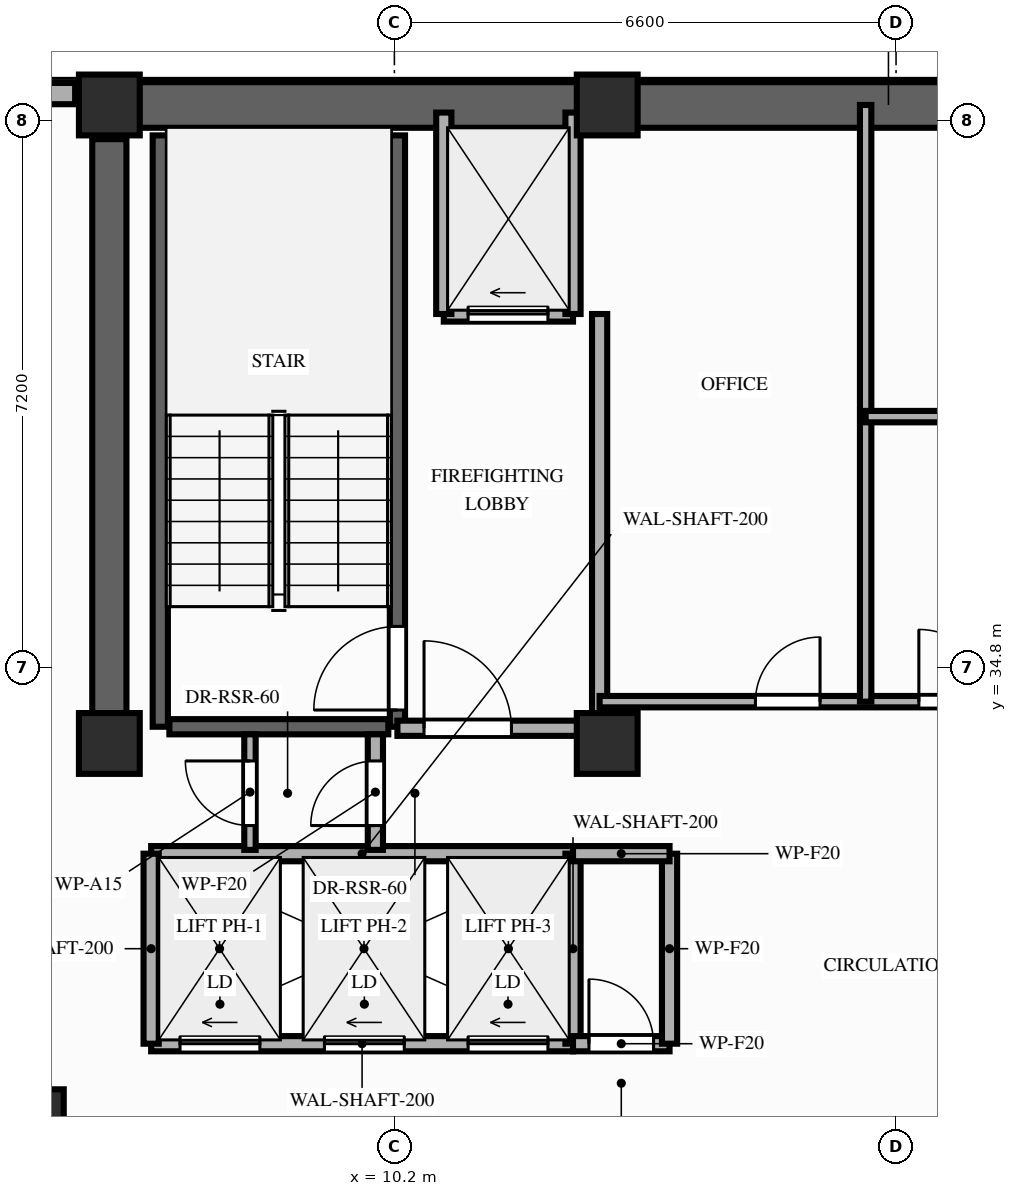
"""IFC4 building model, lengths in metres.
Left out: names, types, materials, properties, quantities, classifications, styles, units other than length and angle.
Written with IfcOpenShell. Run it as: python <this file> out.ifc"""

import sys

from ifc_helpers import new_model, si_unit, direction, frame, frame_2d, origin, origin_2d, place, context, subcontext, project, spatial, rectangle, extrude, element, fill, save


model = new_model("IFC4")
c1 = context("Model", 3, precision=1e-05, world=origin(), true_north=direction((0.0, 1.0)))
c2 = subcontext(c1, "Body", "Model", "MODEL_VIEW")
j1 = project(units=[si_unit("LENGTHUNIT", "METRE"), si_unit("PLANEANGLEUNIT", "RADIAN")], contexts=[c1])
p1 = place(None, origin())
s1 = spatial("IfcSite", under=j1, at=p1, CompositionType="ELEMENT")
p2 = place(p1, origin())
s2 = spatial("IfcBuilding", under=s1, at=p2, CompositionType="ELEMENT")
p3 = place(p2, frame((0.0, 0.0, 201.6)))
s3 = spatial("IfcBuildingStorey", under=s2, at=p3, CompositionType="ELEMENT", Elevation=201.6)
for number, where, z_axis, x_axis in (
    (1, (6.45, 33.8, 0.0), (0.0, 0.0, 1.0), (1.0, 0.0, 0.0)),
    (2, (13.0, 33.8, 0.0), (0.0, 0.0, 1.0), (1.0, 0.0, 0.0)),
    (3, (6.45, 42.2, 0.0), (0.0, 0.0, 1.0), (1.0, 0.0, 0.0)),
    (4, (13.0, 42.2, 0.0), (0.0, 0.0, 1.0), (1.0, 0.0, 0.0)),
):
    element("IfcColumn", number, at=place(p3, frame(where, z_axis=z_axis, x_axis=x_axis)), inside=s3, PredefinedType="COLUMN", context=c2, shape_type="SweptSolid", body=[
        extrude(rectangle(XDim=0.8, YDim=0.8, at=origin_2d()), origin(), (0.0, 0.0, 1.0), 3.2),
    ])
p4 = place(p3, frame((5.4, 28.8, 0.0), z_axis=(0.0, 0.0, 1.0), x_axis=(1.0, 0.0, 0.0)))
e5 = element("IfcColumn", 5, at=p4, inside=s3, PredefinedType="COLUMN", context=c2, shape_type="SweptSolid", body=[
    extrude(rectangle(XDim=0.9, YDim=0.9, at=origin_2d()), origin(), (0.0, 0.0, 1.0), 3.2),
])
p5 = place(p3, frame((6.0, 42.35, 0.0), z_axis=(0.0, 0.0, 1.0), x_axis=(-1.0, 0.0, 0.0)))
e6 = element("IfcWall", 6, at=p5, inside=s3, PredefinedType="STANDARD", context=c2, shape_type="SweptSolid", body=[
    extrude(rectangle(XDim=2.0, YDim=0.28, at=frame_2d((1.0, 0.0))), origin(), (0.0, 0.0, 1.0), 3.02),
])
p6 = place(p3, frame((6.45, 42.2, 0.0), z_axis=(0.0, 0.0, 1.0), x_axis=(1.0, 0.0, 0.0)))
e7 = element("IfcWall", 7, at=p6, inside=s3, PredefinedType="SHEAR", context=c2, shape_type="SweptSolid", body=[
    extrude(rectangle(XDim=20.45, YDim=0.6, at=frame_2d((10.225, 0.0))), origin(), (0.0, 0.0, 1.0), 3.02),
])
p7 = place(p3, frame((6.45, 33.8, 0.0), z_axis=(0.0, 0.0, 1.0), x_axis=(0.0, 1.0, 0.0)))
e8 = element("IfcWall", 8, at=p7, inside=s3, PredefinedType="SHEAR", context=c2, shape_type="SweptSolid", body=[
    extrude(rectangle(XDim=7.95, YDim=0.45, at=frame_2d((3.975, 0.0))), origin(), (0.0, 0.0, 1.0), 3.02),
])
p8 = place(p3, frame((7.12, 34.02, 0.0), z_axis=(0.0, 0.0, 1.0), x_axis=(0.0, 1.0, 0.0)))
e9 = element("IfcWall", 9, at=p8, inside=s3, PredefinedType="SHEAR", context=c2, shape_type="SweptSolid", body=[
    extrude(rectangle(XDim=7.78, YDim=0.2, at=frame_2d((3.89, 0.0))), origin(), (0.0, 0.0, 1.0), 3.02),
])
p9 = place(p3, frame((10.24, 34.02, 0.0), z_axis=(0.0, 0.0, 1.0), x_axis=(0.0, 1.0, 0.0)))
e10 = element("IfcWall", 10, at=p9, inside=s3, PredefinedType="SHEAR", context=c2, shape_type="SweptSolid", body=[
    extrude(rectangle(XDim=7.78, YDim=0.2, at=frame_2d((3.89, 0.0))), origin(), (0.0, 0.0, 1.0), 3.02),
])
p10 = place(p9, frame((0.22, 0.0, 0.0)))
e11 = element("IfcOpeningElement", 11, at=p10, cuts=e10, PredefinedType="OPENING", context=c2, shape_type="SweptSolid", body=[
    extrude(rectangle(XDim=1.1, YDim=2.15, at=frame_2d((0.55, 1.075))), frame((0.0, 0.11, 0.0), z_axis=(0.0, -1.0, 0.0), x_axis=(1.0, 0.0, 0.0)), (0.0, 0.0, 1.0), 0.22),
])
p11 = place(p3, frame((7.24, 34.02, 0.0), z_axis=(0.0, 0.0, 1.0), x_axis=(1.0, 0.0, 0.0)))
e12 = element("IfcWall", 12, at=p11, inside=s3, PredefinedType="SHEAR", context=c2, shape_type="SweptSolid", body=[
    extrude(rectangle(XDim=2.88, YDim=0.2, at=frame_2d((1.44, 0.0))), origin(), (0.0, 0.0, 1.0), 3.02),
])
p12 = place(p3, frame((7.0, 29.85, 0.0), z_axis=(0.0, 0.0, 1.0), x_axis=(1.0, 0.0, 0.0)))
e13 = element("IfcWall", 13, at=p12, inside=s3, PredefinedType="MOVABLE", context=c2, shape_type="SweptSolid", body=[
    extrude(rectangle(XDim=5.55, YDim=0.2, at=frame_2d((2.775, 0.0))), origin(), (0.0, 0.0, 1.0), 3.02),
])
p13 = place(p12, frame((0.38, 0.0, 0.0)))
e14 = element("IfcOpeningElement", 14, at=p13, cuts=e13, PredefinedType="OPENING", context=c2, shape_type="SweptSolid", body=[
    extrude(rectangle(XDim=1.05, YDim=2.15, at=frame_2d((0.525, 1.075))), frame((0.0, 0.11, 0.0), z_axis=(0.0, -1.0, 0.0), x_axis=(1.0, 0.0, 0.0)), (0.0, 0.0, 1.0), 0.22),
])
p14 = place(p12, frame((2.28, 0.0, 0.0)))
e15 = element("IfcOpeningElement", 15, at=p14, cuts=e13, PredefinedType="OPENING", context=c2, shape_type="SweptSolid", body=[
    extrude(rectangle(XDim=1.05, YDim=2.15, at=frame_2d((0.525, 1.075))), frame((0.0, 0.11, 0.0), z_axis=(0.0, -1.0, 0.0), x_axis=(1.0, 0.0, 0.0)), (0.0, 0.0, 1.0), 0.22),
])
p15 = place(p12, frame((4.17, 0.0, 0.0)))
e16 = element("IfcOpeningElement", 16, at=p15, cuts=e13, PredefinedType="OPENING", context=c2, shape_type="SweptSolid", body=[
    extrude(rectangle(XDim=1.05, YDim=2.15, at=frame_2d((0.525, 1.075))), frame((0.0, 0.11, 0.0), z_axis=(0.0, -1.0, 0.0), x_axis=(1.0, 0.0, 0.0)), (0.0, 0.0, 1.0), 0.22),
])
p16 = place(p3, frame((7.0, 32.35, 0.0), z_axis=(0.0, 0.0, 1.0), x_axis=(1.0, 0.0, 0.0)))
e17 = element("IfcWall", 17, at=p16, inside=s3, PredefinedType="MOVABLE", context=c2, shape_type="SweptSolid", body=[
    extrude(rectangle(XDim=5.55, YDim=0.2, at=frame_2d((2.775, 0.0))), origin(), (0.0, 0.0, 1.0), 3.02),
])
for number, where, z_axis, x_axis in (
    (18, (7.0, 29.85, 0.0), (0.0, 0.0, 1.0), (0.0, 1.0, 0.0)),
    (19, (12.55, 29.85, 0.0), (0.0, 0.0, 1.0), (0.0, 1.0, 0.0)),
):
    element("IfcWall", number, at=place(p3, frame(where, z_axis=z_axis, x_axis=x_axis)), inside=s3, PredefinedType="MOVABLE", context=c2, shape_type="SweptSolid", body=[
        extrude(rectangle(XDim=2.5, YDim=0.2, at=frame_2d((1.25, 0.0))), origin(), (0.0, 0.0, 1.0), 3.02),
    ])
p17 = place(p3, frame((10.85, 39.45, 0.0), z_axis=(0.0, 0.0, 1.0), x_axis=(1.0, 0.0, 0.0)))
e20 = element("IfcWall", 20, at=p17, inside=s3, PredefinedType="MOVABLE", context=c2, shape_type="SweptSolid", body=[
    extrude(rectangle(XDim=1.7, YDim=0.2, at=frame_2d((0.85, 0.0))), origin(), (0.0, 0.0, 1.0), 3.02),
])
p18 = place(p17, frame((0.32, 0.0, 0.0)))
e21 = element("IfcOpeningElement", 21, at=p18, cuts=e20, PredefinedType="OPENING", context=c2, shape_type="SweptSolid", body=[
    extrude(rectangle(XDim=1.05, YDim=2.15, at=frame_2d((0.525, 1.075))), frame((0.0, 0.11, 0.0), z_axis=(0.0, -1.0, 0.0), x_axis=(1.0, 0.0, 0.0)), (0.0, 0.0, 1.0), 0.22),
])
for number, where, z_axis, x_axis in (
    (22, (10.85, 39.45, 0.0), (0.0, 0.0, 1.0), (0.0, 1.0, 0.0)),
    (23, (12.55, 39.45, 0.0), (0.0, 0.0, 1.0), (0.0, 1.0, 0.0)),
):
    element("IfcWall", number, at=place(p3, frame(where, z_axis=z_axis, x_axis=x_axis)), inside=s3, PredefinedType="MOVABLE", context=c2, shape_type="SweptSolid", body=[
        extrude(rectangle(XDim=2.65, YDim=0.2, at=frame_2d((1.325, 0.0))), origin(), (0.0, 0.0, 1.0), 2.51),
    ])
p19 = place(p3, frame((12.9, 34.0, 0.0), z_axis=(0.0, 0.0, 1.0), x_axis=(0.0, 1.0, 0.0)))
e24 = element("IfcWall", 24, at=p19, inside=s3, PredefinedType="PARTITIONING", context=c2, shape_type="SweptSolid", body=[
    extrude(rectangle(XDim=5.45, YDim=0.2, at=frame_2d((2.725, 0.0))), origin(), (0.0, 0.0, 1.0), 2.51),
])
p20 = place(p3, frame((10.24, 34.0, 0.0), z_axis=(0.0, 0.0, 1.0), x_axis=(1.0, 0.0, 0.0)))
e25 = element("IfcWall", 25, at=p20, inside=s3, PredefinedType="PARTITIONING", context=c2, shape_type="SweptSolid", body=[
    extrude(rectangle(XDim=2.66, YDim=0.2, at=frame_2d((1.33, 0.0))), origin(), (0.0, 0.0, 1.0), 2.51),
])
p21 = place(p20, frame((0.35, 0.0, 0.0)))
e26 = element("IfcOpeningElement", 26, at=p21, cuts=e25, PredefinedType="OPENING", context=c2, shape_type="SweptSolid", body=[
    extrude(rectangle(XDim=1.15, YDim=2.15, at=frame_2d((0.575, 1.075))), frame((0.0, 0.11, 0.0), z_axis=(0.0, -1.0, 0.0), x_axis=(1.0, 0.0, 0.0)), (0.0, 0.0, 1.0), 0.22),
])
p22 = place(p3, frame((9.95, 32.4, 0.0), z_axis=(0.0, 0.0, 1.0), x_axis=(0.0, 1.0, 0.0)))
e27 = element("IfcWall", 27, at=p22, inside=s3, PredefinedType="PARTITIONING", context=c2, shape_type="SweptSolid", body=[
    extrude(rectangle(XDim=1.52, YDim=0.2, at=frame_2d((0.76, 0.0))), origin(), (0.0, 0.0, 1.0), 2.51),
])
p23 = place(p22, frame((0.32, 0.0, 0.0)))
e28 = element("IfcOpeningElement", 28, at=p23, cuts=e27, PredefinedType="OPENING", context=c2, shape_type="SweptSolid", body=[
    extrude(rectangle(XDim=0.85, YDim=2.05, at=frame_2d((0.425, 1.025))), frame((0.0, 0.11, 0.0), z_axis=(0.0, -1.0, 0.0), x_axis=(1.0, 0.0, 0.0)), (0.0, 0.0, 1.0), 0.22),
])
p24 = place(p3, frame((8.3, 32.4, 0.0), z_axis=(0.0, 0.0, 1.0), x_axis=(0.0, 1.0, 0.0)))
e29 = element("IfcWall", 29, at=p24, inside=s3, PredefinedType="PARTITIONING", context=c2, shape_type="SweptSolid", body=[
    extrude(rectangle(XDim=1.52, YDim=0.15, at=frame_2d((0.76, 0.0))), origin(), (0.0, 0.0, 1.0), 2.51),
])
p25 = place(p24, frame((0.32, 0.0, 0.0)))
e30 = element("IfcOpeningElement", 30, at=p25, cuts=e29, PredefinedType="OPENING", context=c2, shape_type="SweptSolid", body=[
    extrude(rectangle(XDim=0.85, YDim=2.05, at=frame_2d((0.425, 1.025))), frame((0.0, 0.085, 0.0), z_axis=(0.0, -1.0, 0.0), x_axis=(1.0, 0.0, 0.0)), (0.0, 0.0, 1.0), 0.17),
])
p26 = place(p3, frame((12.55, 29.85, 0.0), z_axis=(0.0, 0.0, 1.0), x_axis=(1.0, 0.0, 0.0)))
e31 = element("IfcWall", 31, at=p26, inside=s3, PredefinedType="PARTITIONING", context=c2, shape_type="SweptSolid", body=[
    extrude(rectangle(XDim=1.27, YDim=0.2, at=frame_2d((0.635, 0.0))), origin(), (0.0, 0.0, 1.0), 3.02),
])
p27 = place(p26, frame((0.21, 0.0, 0.0)))
e32 = element("IfcOpeningElement", 32, at=p27, cuts=e31, PredefinedType="OPENING", context=c2, shape_type="SweptSolid", body=[
    extrude(rectangle(XDim=0.85, YDim=2.05, at=frame_2d((0.425, 1.025))), frame((0.0, 0.11, 0.0), z_axis=(0.0, -1.0, 0.0), x_axis=(1.0, 0.0, 0.0)), (0.0, 0.0, 1.0), 0.22),
])
p28 = place(p3, frame((13.82, 29.85, 0.0), z_axis=(0.0, 0.0, 1.0), x_axis=(0.0, 1.0, 0.0)))
e33 = element("IfcWall", 33, at=p28, inside=s3, PredefinedType="PARTITIONING", context=c2, shape_type="SweptSolid", body=[
    extrude(rectangle(XDim=2.5, YDim=0.2, at=frame_2d((1.25, 0.0))), origin(), (0.0, 0.0, 1.0), 3.02),
])
p29 = place(p3, frame((12.55, 32.35, 0.0), z_axis=(0.0, 0.0, 1.0), x_axis=(1.0, 0.0, 0.0)))
e34 = element("IfcWall", 34, at=p29, inside=s3, PredefinedType="PARTITIONING", context=c2, shape_type="SweptSolid", body=[
    extrude(rectangle(XDim=1.27, YDim=0.2, at=frame_2d((0.635, 0.0))), origin(), (0.0, 0.0, 1.0), 3.02),
])
p30 = place(p3, frame((12.9, 34.35, 0.0), z_axis=(0.0, 0.0, 1.0), x_axis=(1.0, 0.0, 0.0)))
e35 = element("IfcWall", 35, at=p30, inside=s3, PredefinedType="PARTITIONING", context=c2, shape_type="SweptSolid", body=[
    extrude(rectangle(XDim=7.6, YDim=0.15, at=frame_2d((3.8, 0.0))), origin(), (0.0, 0.0, 1.0), 3.02),
])
p31 = place(p30, frame((2.05, 0.0, 0.0)))
e36 = element("IfcOpeningElement", 36, at=p31, cuts=e35, PredefinedType="OPENING", context=c2, shape_type="SweptSolid", body=[
    extrude(rectangle(XDim=0.85, YDim=2.05, at=frame_2d((0.425, 1.025))), frame((0.0, 0.085, 0.0), z_axis=(0.0, -1.0, 0.0), x_axis=(1.0, 0.0, 0.0)), (0.0, 0.0, 1.0), 0.17),
])
p32 = place(p30, frame((4.2, 0.0, 0.0)))
e37 = element("IfcOpeningElement", 37, at=p32, cuts=e35, PredefinedType="OPENING", context=c2, shape_type="SweptSolid", body=[
    extrude(rectangle(XDim=0.95, YDim=2.15, at=frame_2d((0.475, 1.075))), frame((0.0, 0.085, 0.0), z_axis=(0.0, -1.0, 0.0), x_axis=(1.0, 0.0, 0.0)), (0.0, 0.0, 1.0), 0.17),
])
p33 = place(p3, frame((16.4, 34.35, 0.0), z_axis=(0.0, 0.0, 1.0), x_axis=(0.0, 1.0, 0.0)))
e38 = element("IfcWall", 38, at=p33, inside=s3, PredefinedType="PARTITIONING", context=c2, shape_type="SweptSolid", body=[
    extrude(rectangle(XDim=7.85, YDim=0.15, at=frame_2d((3.925, 0.0))), origin(), (0.0, 0.0, 1.0), 2.51),
])
p34 = place(p3, frame((16.4, 38.1, 0.0), z_axis=(0.0, 0.0, 1.0), x_axis=(1.0, 0.0, 0.0)))
e39 = element("IfcWall", 39, at=p34, inside=s3, PredefinedType="PARTITIONING", context=c2, shape_type="SweptSolid", body=[
    extrude(rectangle(XDim=4.05, YDim=0.15, at=frame_2d((2.025, 0.0))), origin(), (0.0, 0.0, 1.0), 3.02),
])
p35 = place(p34, frame((1.6, 0.0, 0.0)))
e40 = element("IfcOpeningElement", 40, at=p35, cuts=e39, PredefinedType="OPENING", context=c2, shape_type="SweptSolid", body=[
    extrude(rectangle(XDim=0.85, YDim=2.05, at=frame_2d((0.425, 1.025))), frame((0.0, 0.085, 0.0), z_axis=(0.0, -1.0, 0.0), x_axis=(1.0, 0.0, 0.0)), (0.0, 0.0, 1.0), 0.17),
])
p36 = place(p10, origin())
e41 = element("IfcDoor", 41, at=p36, inside=s3, OperationType="SINGLE_SWING_LEFT", PredefinedType="DOOR", context=c2, shape_type="SweptSolid", body=[
    extrude(rectangle(XDim=1.1, YDim=2.15, at=frame_2d((0.55, 1.075))), frame((0.0, 0.025, 0.0), z_axis=(0.0, -1.0, 0.0), x_axis=(1.0, 0.0, 0.0)), (0.0, 0.0, 1.0), 0.05),
])
fill(e11, e41)
p37 = place(p13, origin())
e42 = element("IfcDoor", 42, at=p37, inside=s3, OperationType="SLIDING_TO_LEFT", PredefinedType="DOOR", context=c2, shape_type="SweptSolid", body=[
    extrude(rectangle(XDim=1.05, YDim=2.15, at=frame_2d((0.525, 1.075))), frame((0.0, 0.025, 0.0), z_axis=(0.0, -1.0, 0.0), x_axis=(1.0, 0.0, 0.0)), (0.0, 0.0, 1.0), 0.05),
])
fill(e14, e42)
p38 = place(p14, origin())
e43 = element("IfcDoor", 43, at=p38, inside=s3, OperationType="SLIDING_TO_LEFT", PredefinedType="DOOR", context=c2, shape_type="SweptSolid", body=[
    extrude(rectangle(XDim=1.05, YDim=2.15, at=frame_2d((0.525, 1.075))), frame((0.0, 0.025, 0.0), z_axis=(0.0, -1.0, 0.0), x_axis=(1.0, 0.0, 0.0)), (0.0, 0.0, 1.0), 0.05),
])
fill(e15, e43)
p39 = place(p15, origin())
e44 = element("IfcDoor", 44, at=p39, inside=s3, OperationType="SLIDING_TO_LEFT", PredefinedType="DOOR", context=c2, shape_type="SweptSolid", body=[
    extrude(rectangle(XDim=1.05, YDim=2.15, at=frame_2d((0.525, 1.075))), frame((0.0, 0.025, 0.0), z_axis=(0.0, -1.0, 0.0), x_axis=(1.0, 0.0, 0.0)), (0.0, 0.0, 1.0), 0.05),
])
fill(e16, e44)
p40 = place(p18, origin())
e45 = element("IfcDoor", 45, at=p40, inside=s3, OperationType="SLIDING_TO_LEFT", PredefinedType="DOOR", context=c2, shape_type="SweptSolid", body=[
    extrude(rectangle(XDim=1.05, YDim=2.15, at=frame_2d((0.525, 1.075))), frame((0.0, 0.025, 0.0), z_axis=(0.0, -1.0, 0.0), x_axis=(1.0, 0.0, 0.0)), (0.0, 0.0, 1.0), 0.05),
])
fill(e21, e45)
p41 = place(p21, origin())
e46 = element("IfcDoor", 46, at=p41, inside=s3, OperationType="SINGLE_SWING_LEFT", PredefinedType="DOOR", context=c2, shape_type="SweptSolid", body=[
    extrude(rectangle(XDim=1.15, YDim=2.15, at=frame_2d((0.575, 1.075))), frame((0.0, 0.025, 0.0), z_axis=(0.0, -1.0, 0.0), x_axis=(1.0, 0.0, 0.0)), (0.0, 0.0, 1.0), 0.05),
])
fill(e26, e46)
p42 = place(p23, origin())
e47 = element("IfcDoor", 47, at=p42, inside=s3, OperationType="SINGLE_SWING_LEFT", PredefinedType="DOOR", context=c2, shape_type="SweptSolid", body=[
    extrude(rectangle(XDim=0.85, YDim=2.05, at=frame_2d((0.425, 1.025))), frame((0.0, 0.025, 0.0), z_axis=(0.0, -1.0, 0.0), x_axis=(1.0, 0.0, 0.0)), (0.0, 0.0, 1.0), 0.05),
])
fill(e28, e47)
p43 = place(p25, origin())
e48 = element("IfcDoor", 48, at=p43, inside=s3, OperationType="SINGLE_SWING_RIGHT", PredefinedType="DOOR", context=c2, shape_type="SweptSolid", body=[
    extrude(rectangle(XDim=0.85, YDim=2.05, at=frame_2d((0.425, 1.025))), frame((0.0, 0.025, 0.0), z_axis=(0.0, -1.0, 0.0), x_axis=(1.0, 0.0, 0.0)), (0.0, 0.0, 1.0), 0.05),
])
fill(e30, e48)
p44 = place(p27, origin())
e49 = element("IfcDoor", 49, at=p44, inside=s3, OperationType="SINGLE_SWING_LEFT", PredefinedType="DOOR", context=c2, shape_type="SweptSolid", body=[
    extrude(rectangle(XDim=0.85, YDim=2.05, at=frame_2d((0.425, 1.025))), frame((0.0, 0.025, 0.0), z_axis=(0.0, -1.0, 0.0), x_axis=(1.0, 0.0, 0.0)), (0.0, 0.0, 1.0), 0.05),
])
fill(e32, e49)
p45 = place(p31, origin())
e50 = element("IfcDoor", 50, at=p45, inside=s3, OperationType="SINGLE_SWING_RIGHT", PredefinedType="DOOR", context=c2, shape_type="SweptSolid", body=[
    extrude(rectangle(XDim=0.85, YDim=2.05, at=frame_2d((0.425, 1.025))), frame((0.0, 0.025, 0.0), z_axis=(0.0, -1.0, 0.0), x_axis=(1.0, 0.0, 0.0)), (0.0, 0.0, 1.0), 0.05),
])
fill(e36, e50)
p46 = place(p32, origin())
e51 = element("IfcDoor", 51, at=p46, inside=s3, OperationType="SINGLE_SWING_LEFT", PredefinedType="DOOR", context=c2, shape_type="SweptSolid", body=[
    extrude(rectangle(XDim=0.95, YDim=2.15, at=frame_2d((0.475, 1.075))), frame((0.0, 0.025, 0.0), z_axis=(0.0, -1.0, 0.0), x_axis=(1.0, 0.0, 0.0)), (0.0, 0.0, 1.0), 0.05),
])
fill(e37, e51)
save(model, sys.argv[1])
